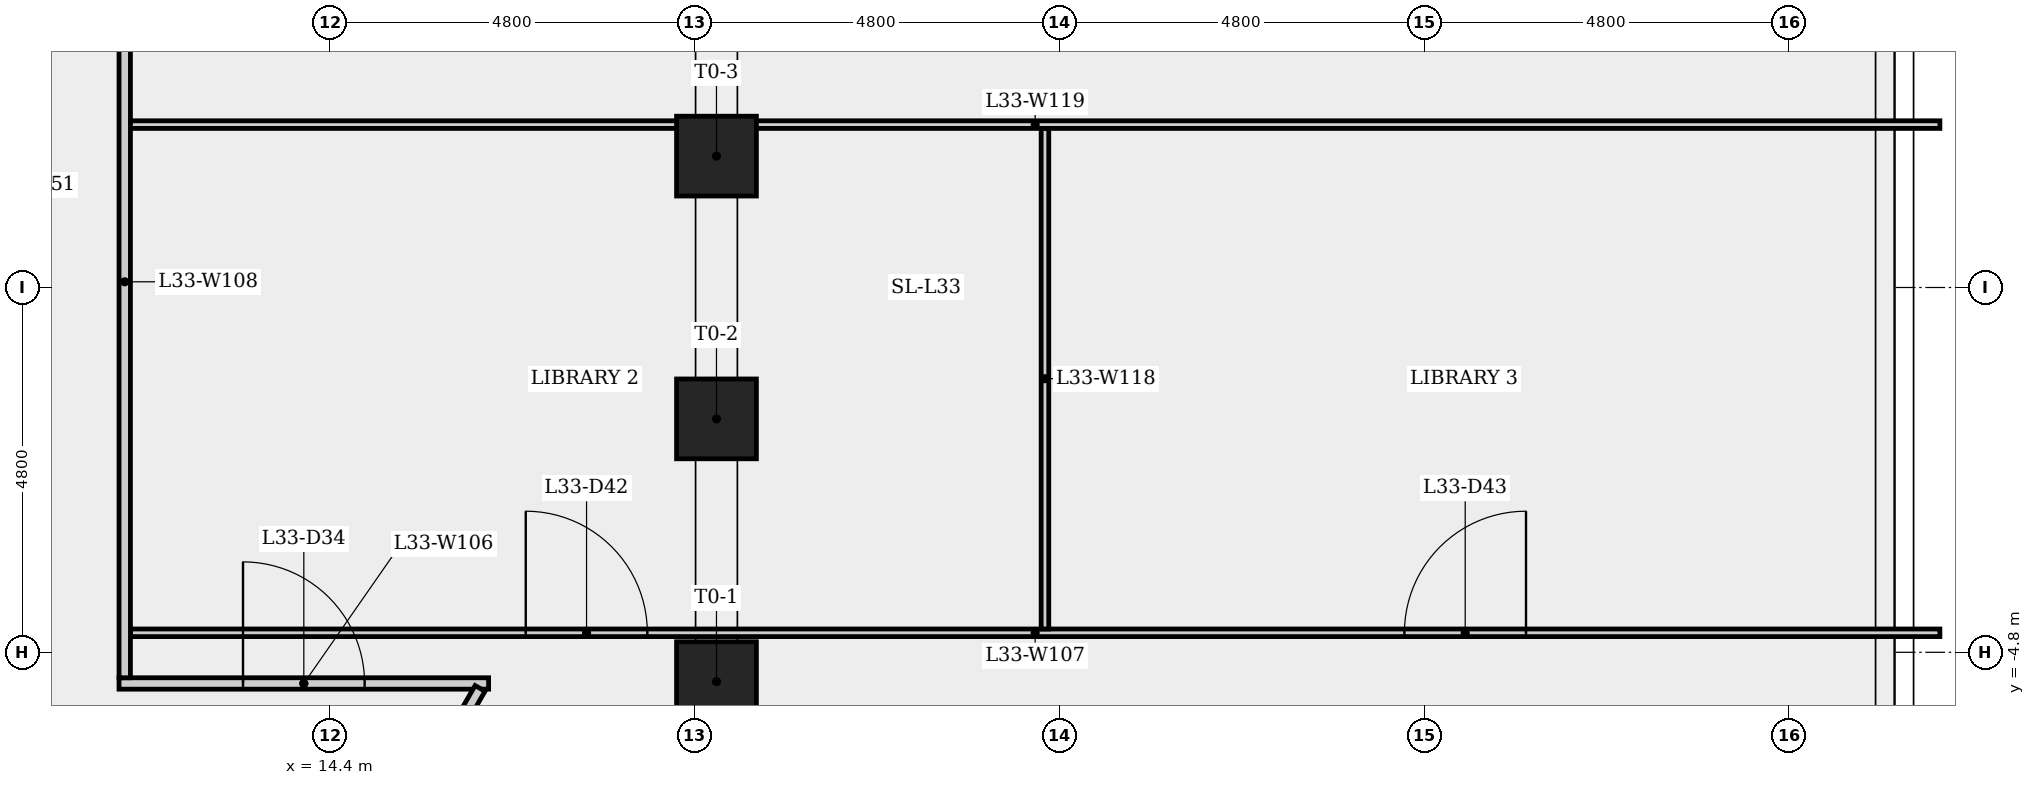
"""IFC4 building model, lengths in metres.
Left out: names, types, materials, properties, quantities, classifications, styles, units other than length and angle.
Written with IfcOpenShell. Run it as: python <this file> out.ifc"""

import sys

from ifc_helpers import new_model, si_unit, direction, frame, frame_2d, origin, origin_2d, place, context, subcontext, project, spatial, rectangle, extrude, element, fill, save


model = new_model("IFC4")
c1 = context("Model", 3, precision=1e-05, world=origin(), true_north=direction((0.0, 1.0)))
c2 = subcontext(c1, "Body", "Model", "MODEL_VIEW")
j1 = project(units=[si_unit("LENGTHUNIT", "METRE"), si_unit("PLANEANGLEUNIT", "RADIAN")], contexts=[c1])
p1 = place(None, origin())
s1 = spatial("IfcSite", under=j1, at=p1, CompositionType="ELEMENT")
p2 = place(p1, origin())
s2 = spatial("IfcBuilding", under=s1, at=p2, CompositionType="ELEMENT")
p3 = place(p2, frame((0.0, 0.0, 124.5)))
s3 = spatial("IfcBuildingStorey", under=s2, at=p3, CompositionType="ELEMENT", Elevation=124.5)
for number, where, z_axis, x_axis in (
    (1, (19.486, -5.186, 0.0), (0.0, 0.0, 1.0), (1.0, 0.0, 0.0)),
    (2, (19.486, -1.729, 0.0), (0.0, 0.0, 1.0), (1.0, 0.0, 0.0)),
    (3, (19.486, 1.729, 0.0), (0.0, 0.0, 1.0), (1.0, 0.0, 0.0)),
):
    element("IfcColumn", number, at=place(p3, frame(where, z_axis=z_axis, x_axis=x_axis)), inside=s3, PredefinedType="COLUMN", context=c2, shape_type="SweptSolid", body=[
        extrude(rectangle(XDim=1.05, YDim=1.05, at=origin_2d()), origin(), (0.0, 0.0, 1.0), 4.0),
    ])
p4 = place(p3, frame((11.625, -5.21, 0.0), z_axis=(0.0, 0.0, 1.0), x_axis=(1.0, 0.0, 0.0)))
e4 = element("IfcWall", 4, at=p4, inside=s3, PredefinedType="PARTITIONING", context=c2, shape_type="SweptSolid", body=[
    extrude(rectangle(XDim=4.863, YDim=0.15, at=frame_2d((2.431, 0.0))), origin(), (0.0, 0.0, 1.0), 3.6),
])
p5 = place(p4, frame((1.631, 0.0, 0.0)))
e5 = element("IfcOpeningElement", 5, at=p5, cuts=e4, PredefinedType="OPENING", context=c2, shape_type="SweptSolid", body=[
    extrude(rectangle(XDim=1.6, YDim=2.1, at=frame_2d((0.8, 1.05))), frame((0.0, 0.085, 0.0), z_axis=(0.0, -1.0, 0.0), x_axis=(1.0, 0.0, 0.0)), (0.0, 0.0, 1.0), 0.17),
])
p6 = place(p3, frame((11.775, -4.543, 0.0), z_axis=(0.0, 0.0, 1.0), x_axis=(1.0, 0.0, 0.0)))
e6 = element("IfcWall", 6, at=p6, inside=s3, PredefinedType="PARTITIONING", context=c2, shape_type="SweptSolid", body=[
    extrude(rectangle(XDim=23.807, YDim=0.1, at=frame_2d((11.903, 0.0))), origin(), (0.0, 0.0, 1.0), 3.6),
])
p7 = place(p6, frame((5.201, 0.0, 0.0)))
e7 = element("IfcOpeningElement", 7, at=p7, cuts=e6, PredefinedType="OPENING", context=c2, shape_type="SweptSolid", body=[
    extrude(rectangle(XDim=1.6, YDim=2.1, at=frame_2d((0.8, 1.05))), frame((0.0, 0.06, 0.0), z_axis=(0.0, -1.0, 0.0), x_axis=(1.0, 0.0, 0.0)), (0.0, 0.0, 1.0), 0.12),
])
p8 = place(p6, frame((16.761, 0.0, 0.0)))
e8 = element("IfcOpeningElement", 8, at=p8, cuts=e6, PredefinedType="OPENING", context=c2, shape_type="SweptSolid", body=[
    extrude(rectangle(XDim=1.6, YDim=2.1, at=frame_2d((0.8, 1.05))), frame((0.0, 0.06, 0.0), z_axis=(0.0, -1.0, 0.0), x_axis=(1.0, 0.0, 0.0)), (0.0, 0.0, 1.0), 0.12),
])
p9 = place(p3, frame((11.7, -5.135, 0.0), z_axis=(0.0, 0.0, 1.0), x_axis=(0.0, 1.0, 0.0)))
e9 = element("IfcWall", 9, at=p9, inside=s3, PredefinedType="PARTITIONING", context=c2, shape_type="SweptSolid", body=[
    extrude(rectangle(XDim=10.42, YDim=0.15, at=frame_2d((5.21, 0.0))), origin(), (0.0, 0.0, 1.0), 3.6),
])
p10 = place(p3, frame((12.185, -12.532, 0.0), z_axis=(0.0, 0.0, 1.0), x_axis=(0.500018368146, 0.86601479867, 0.0)))
e10 = element("IfcWall", 10, at=p10, inside=s3, PredefinedType="PARTITIONING", context=c2, shape_type="SweptSolid", body=[
    extrude(rectangle(XDim=8.38, YDim=0.15, at=frame_2d((4.19, 0.0))), origin(), (0.0, 0.0, 1.0), 3.6),
])
p11 = place(p10, frame((2.135, 0.0, 0.0)))
e11 = element("IfcOpeningElement", 11, at=p11, cuts=e10, PredefinedType="OPENING", context=c2, shape_type="SweptSolid", body=[
    extrude(rectangle(XDim=1.0, YDim=2.1, at=frame_2d((0.5, 1.05))), frame((0.0, 0.085, 0.0), z_axis=(0.0, -1.0, 0.0), x_axis=(1.0, 0.0, 0.0)), (0.0, 0.0, 1.0), 0.17),
])
p12 = place(p3, frame((23.807, 2.093, 0.0), z_axis=(0.0, 0.0, 1.0), x_axis=(0.0, -1.0, 0.0)))
e12 = element("IfcWall", 12, at=p12, inside=s3, PredefinedType="PARTITIONING", context=c2, shape_type="SweptSolid", body=[
    extrude(rectangle(XDim=6.587, YDim=0.1, at=frame_2d((3.293, 0.0))), origin(), (0.0, 0.0, 1.0), 3.6),
])
p13 = place(p3, frame((11.775, 2.143, 0.0), z_axis=(0.0, 0.0, 1.0), x_axis=(1.0, 0.0, 0.0)))
e13 = element("IfcWall", 13, at=p13, inside=s3, PredefinedType="PARTITIONING", context=c2, shape_type="SweptSolid", body=[
    extrude(rectangle(XDim=23.807, YDim=0.1, at=frame_2d((11.903, 0.0))), origin(), (0.0, 0.0, 1.0), 3.6),
])
p14 = place(p5, origin())
e14 = element("IfcDoor", 14, at=p14, inside=s3, OperationType="SINGLE_SWING_LEFT", PredefinedType="DOOR", context=c2, shape_type="SweptSolid", body=[
    extrude(rectangle(XDim=1.6, YDim=2.1, at=frame_2d((0.8, 1.05))), frame((0.0, 0.025, 0.0), z_axis=(0.0, -1.0, 0.0), x_axis=(1.0, 0.0, 0.0)), (0.0, 0.0, 1.0), 0.05),
])
fill(e5, e14)
p15 = place(p7, origin())
e15 = element("IfcDoor", 15, at=p15, inside=s3, OperationType="SINGLE_SWING_LEFT", PredefinedType="DOOR", context=c2, shape_type="SweptSolid", body=[
    extrude(rectangle(XDim=1.6, YDim=2.1, at=frame_2d((0.8, 1.05))), frame((0.0, 0.025, 0.0), z_axis=(0.0, -1.0, 0.0), x_axis=(1.0, 0.0, 0.0)), (0.0, 0.0, 1.0), 0.05),
])
fill(e7, e15)
p16 = place(p8, origin())
e16 = element("IfcDoor", 16, at=p16, inside=s3, OperationType="SINGLE_SWING_RIGHT", PredefinedType="DOOR", context=c2, shape_type="SweptSolid", body=[
    extrude(rectangle(XDim=1.6, YDim=2.1, at=frame_2d((0.8, 1.05))), frame((0.0, 0.025, 0.0), z_axis=(0.0, -1.0, 0.0), x_axis=(1.0, 0.0, 0.0)), (0.0, 0.0, 1.0), 0.05),
])
fill(e8, e16)
save(model, sys.argv[1])
